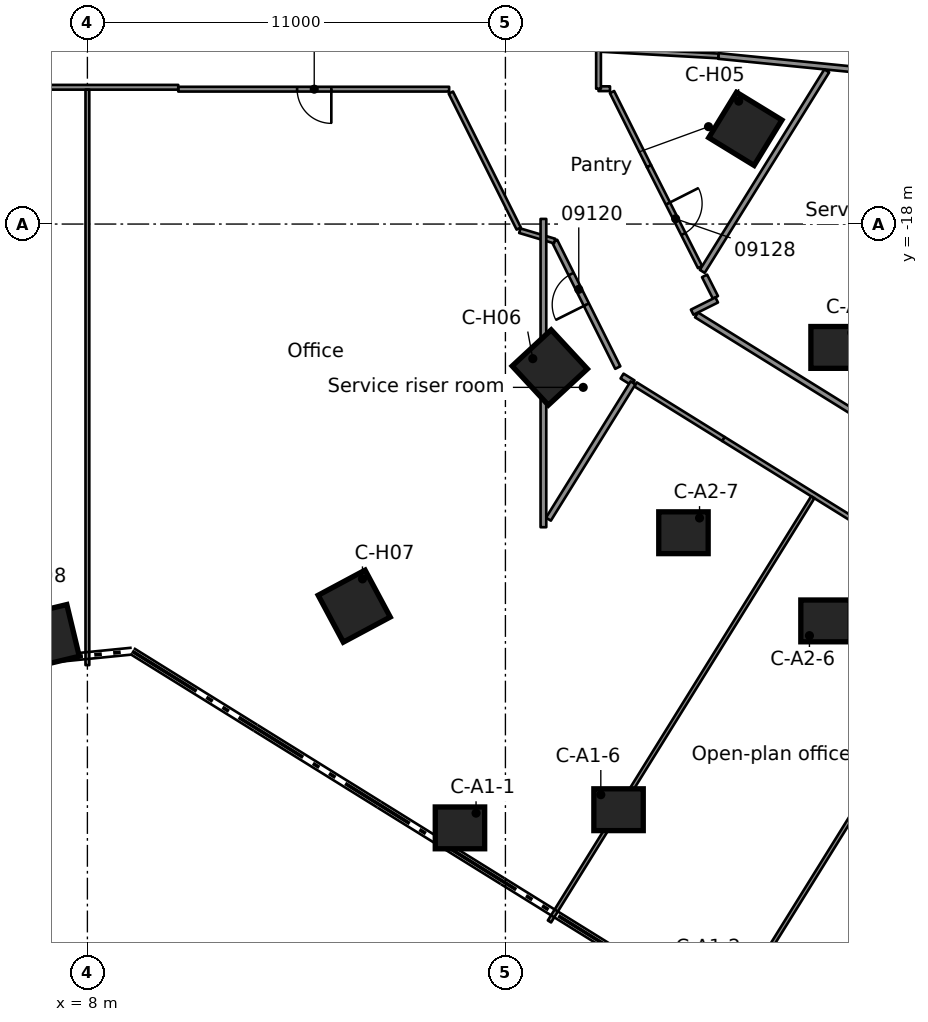
"""IFC4 building model, lengths in metres.
Left out: names, types, materials, properties, quantities, classifications, styles, units other than length and angle.
Written with IfcOpenShell. Run it as: python <this file> out.ifc"""

import sys

from ifc_helpers import new_model, si_unit, direction, frame, frame_2d, origin, origin_2d, place, context, subcontext, project, spatial, rectangle, extrude, element, fill, save


model = new_model("IFC4")
c1 = context("Model", 3, precision=1e-05, world=origin(), true_north=direction((0.0, 1.0)))
c2 = subcontext(c1, "Body", "Model", "MODEL_VIEW")
j1 = project(units=[si_unit("LENGTHUNIT", "METRE"), si_unit("PLANEANGLEUNIT", "RADIAN")], contexts=[c1])
p1 = place(None, origin())
s1 = spatial("IfcSite", under=j1, at=p1, CompositionType="ELEMENT")
p2 = place(p1, origin())
s2 = spatial("IfcBuilding", under=s1, at=p2, CompositionType="ELEMENT")
p3 = place(p2, frame((0.0, 0.0, 40.8)))
s3 = spatial("IfcBuildingStorey", under=s2, at=p3, CompositionType="ELEMENT", Elevation=40.8)
for number, where, z_axis, x_axis in (
    (1, (17.804, -33.888, 0.0), (0.0, 0.0, 1.0), (1.0, 0.0, 0.0)),
    (2, (21.977, -33.41, 0.0), (0.0, 0.0, 1.0), (1.0, 0.0, 0.0)),
    (3, (27.423, -28.442, 0.0), (0.0, 0.0, 1.0), (1.0, 0.0, 0.0)),
    (4, (23.685, -26.122, 0.0), (0.0, 0.0, 1.0), (1.0, 0.0, 0.0)),
    (5, (27.688, -21.246, 0.0), (0.0, 0.0, 1.0), (1.0, 0.0, 0.0)),
):
    element("IfcColumn", number, at=place(p3, frame(where, z_axis=z_axis, x_axis=x_axis)), inside=s3, PredefinedType="COLUMN", context=c2, shape_type="SweptSolid", body=[
        extrude(rectangle(XDim=1.3, YDim=1.1, at=origin_2d()), origin(), (0.0, 0.0, 1.0), 3.5),
    ])
for number, where, z_axis, x_axis in (
    (6, (25.313, -15.495, 0.0), (0.0, 0.0, 1.0), (0.853, -0.522, 0.0)),
    (7, (20.167, -21.774, 0.0), (0.0, 0.0, 1.0), (0.68, -0.734, 0.0)),
    (8, (15.021, -28.054, 0.0), (0.0, 0.0, 1.0), (0.472, -0.882, 0.0)),
    (9, (6.942, -28.856, 0.0), (0.0, 0.0, 1.0), (0.234, -0.972, 0.0)),
):
    element("IfcColumn", number, at=place(p3, frame(where, z_axis=z_axis, x_axis=x_axis)), inside=s3, PredefinedType="COLUMN", context=c2, shape_type="SweptSolid", body=[
        extrude(rectangle(XDim=1.4, YDim=1.4, at=origin_2d()), origin(), (0.0, 0.0, 1.0), 3.5),
    ])
p4 = place(p3, frame((17.564, -14.541, 0.0), z_axis=(0.0, 0.0, 1.0), x_axis=(0.446749443477, -0.894659116509, 0.0)))
e10 = element("IfcWall", 10, at=p4, inside=s3, PredefinedType="PARTITIONING", context=c2, shape_type="SweptSolid", body=[
    extrude(rectangle(XDim=3.998, YDim=0.125, at=frame_2d((1.999, 0.0))), origin(), (0.0, 0.0, 1.0), 3.06),
])
p5 = place(p3, frame((21.957, -21.776, 0.0), z_axis=(0.0, 0.0, 1.0), x_axis=(-0.446609612261, 0.894728927797, 0.0)))
e11 = element("IfcWall", 11, at=p5, inside=s3, PredefinedType="PARTITIONING", context=c2, shape_type="SweptSolid", body=[
    extrude(rectangle(XDim=3.719, YDim=0.15, at=frame_2d((1.86, 0.0))), origin(), (0.0, 0.0, 1.0), 3.06),
])
p6 = place(p5, frame((1.85, 0.0, 0.0)))
e12 = element("IfcOpeningElement", 12, at=p6, cuts=e11, PredefinedType="OPENING", context=c2, shape_type="SweptSolid", body=[
    extrude(rectangle(XDim=0.9, YDim=2.1, at=frame_2d((0.45, 1.05))), frame((0.0, 0.085, 0.0), z_axis=(0.0, -1.0, 0.0), x_axis=(1.0, 0.0, 0.0)), (0.0, 0.0, 1.0), 0.17),
])
p7 = place(p3, frame((21.805, -14.527, 0.0), z_axis=(0.0, 0.0, 1.0), x_axis=(0.446720903114, -0.894673367616, 0.0)))
e13 = element("IfcWall", 13, at=p7, inside=s3, PredefinedType="PARTITIONING", context=c2, shape_type="SweptSolid", body=[
    extrude(rectangle(XDim=2.181, YDim=0.125, at=frame_2d((1.09, 0.0))), origin(), (0.0, 0.0, 1.0), 3.06),
])
p8 = place(p3, frame((24.24, -19.364, 0.0), z_axis=(0.0, 0.0, 1.0), x_axis=(0.451527001133, -0.892257455698, 0.0)))
e14 = element("IfcWall", 14, at=p8, inside=s3, PredefinedType="PARTITIONING", context=c2, shape_type="SweptSolid", body=[
    extrude(rectangle(XDim=0.633, YDim=0.15, at=frame_2d((0.316, 0.0))), origin(), (0.0, 0.0, 1.0), 3.06),
])
p9 = place(p3, frame((22.779, -16.478, 0.0), z_axis=(0.0, 0.0, 1.0), x_axis=(0.451638349486, -0.892201099121, 0.0)))
e15 = element("IfcWall", 15, at=p9, inside=s3, PredefinedType="PARTITIONING", context=c2, shape_type="SweptSolid", body=[
    extrude(rectangle(XDim=2.976, YDim=0.125, at=frame_2d((1.488, 0.0))), origin(), (0.0, 0.0, 1.0), 3.06),
])
p10 = place(p9, frame((1.1, 0.0, 0.0)))
e16 = element("IfcOpeningElement", 16, at=p10, cuts=e15, PredefinedType="OPENING", context=c2, shape_type="SweptSolid", body=[
    extrude(rectangle(XDim=0.9, YDim=2.1, at=frame_2d((0.45, 1.05))), frame((0.0, 0.073, 0.0), z_axis=(0.0, -1.0, 0.0), x_axis=(1.0, 0.0, 0.0)), (0.0, 0.0, 1.0), 0.145),
])
p11 = place(p3, frame((22.424, -22.219, 0.0), z_axis=(0.0, 0.0, 1.0), x_axis=(0.849454635984, -0.527661654287, 0.0)))
e17 = element("IfcWall", 17, at=p11, inside=s3, PredefinedType="PARTITIONING", context=c2, shape_type="SweptSolid", body=[
    extrude(rectangle(XDim=2.725, YDim=0.125, at=frame_2d((1.363, 0.0))), origin(), (0.0, 0.0, 1.0), 3.06),
])
p12 = place(p3, frame((22.069, -22.0, 0.0), z_axis=(0.0, 0.0, 1.0), x_axis=(0.850050687586, -0.526700890956, 0.0)))
e18 = element("IfcWall", 18, at=p12, inside=s3, PredefinedType="PARTITIONING", context=c2, shape_type="SweptSolid", body=[
    extrude(rectangle(XDim=0.34, YDim=0.15, at=frame_2d((0.17, 0.0))), origin(), (0.0, 0.0, 1.0), 3.06),
])
p13 = place(p3, frame((43.367, -35.223, 0.0), z_axis=(0.0, 0.0, 1.0), x_axis=(-0.849563429412, 0.527486473197, 0.0)))
e19 = element("IfcWall", 19, at=p13, inside=s3, PredefinedType="PARTITIONING", context=c2, shape_type="SweptSolid", body=[
    extrude(rectangle(XDim=21.927, YDim=0.125, at=frame_2d((10.963, 0.0))), origin(), (0.0, 0.0, 1.0), 3.06),
])
p14 = place(p13, frame((10.574, 0.0, 0.0)))
e20 = element("IfcOpeningElement", 20, at=p14, cuts=e19, PredefinedType="OPENING", context=c2, shape_type="SweptSolid", body=[
    extrude(rectangle(XDim=0.9, YDim=2.1, at=frame_2d((0.45, 1.05))), frame((0.0, 0.073, 0.0), z_axis=(0.0, -1.0, 0.0), x_axis=(1.0, 0.0, 0.0)), (0.0, 0.0, 1.0), 0.145),
])
p15 = place(p13, frame((4.973, 0.0, 0.0)))
e21 = element("IfcOpeningElement", 21, at=p15, cuts=e19, PredefinedType="OPENING", context=c2, shape_type="SweptSolid", body=[
    extrude(rectangle(XDim=0.9, YDim=2.1, at=frame_2d((0.45, 1.05))), frame((0.0, 0.073, 0.0), z_axis=(0.0, -1.0, 0.0), x_axis=(1.0, 0.0, 0.0)), (0.0, 0.0, 1.0), 0.145),
])
p16 = place(p13, frame((15.923, 0.0, 0.0)))
e22 = element("IfcOpeningElement", 22, at=p16, cuts=e19, PredefinedType="OPENING", context=c2, shape_type="SweptSolid", body=[
    extrude(rectangle(XDim=1.1, YDim=2.1, at=frame_2d((0.55, 1.05))), frame((0.0, 0.073, 0.0), z_axis=(0.0, -1.0, 0.0), x_axis=(1.0, 0.0, 0.0)), (0.0, 0.0, 1.0), 0.145),
])
p17 = place(p3, frame((24.028, -20.39, 0.0), z_axis=(0.0, 0.0, 1.0), x_axis=(0.8496545068, -0.527339756775, 0.0)))
e23 = element("IfcWall", 23, at=p17, inside=s3, PredefinedType="PARTITIONING", context=c2, shape_type="SweptSolid", body=[
    extrude(rectangle(XDim=21.569, YDim=0.15, at=frame_2d((10.784, 0.0))), origin(), (0.0, 0.0, 1.0), 3.06),
])
p18 = place(p17, frame((15.532, 0.0, 0.0)))
e24 = element("IfcOpeningElement", 24, at=p18, cuts=e23, PredefinedType="OPENING", context=c2, shape_type="SweptSolid", body=[
    extrude(rectangle(XDim=0.9, YDim=2.1, at=frame_2d((0.45, 1.05))), frame((0.0, 0.085, 0.0), z_axis=(0.0, -1.0, 0.0), x_axis=(1.0, 0.0, 0.0)), (0.0, 0.0, 1.0), 0.17),
])
p19 = place(p3, frame((24.604, -13.577, 0.0), z_axis=(0.0, 0.0, 1.0), x_axis=(0.995072238477, -0.099152610724, 0.0)))
e25 = element("IfcWall", 25, at=p19, inside=s3, PredefinedType="PARTITIONING", context=c2, shape_type="SweptSolid", body=[
    extrude(rectangle(XDim=3.511, YDim=0.15, at=frame_2d((1.756, 0.0))), origin(), (0.0, 0.0, 1.0), 3.06),
])
p20 = place(p3, frame((24.604, -13.577, 0.0), z_axis=(0.0, 0.0, 1.0), x_axis=(-0.998441130735, 0.055814948327, 0.0)))
e26 = element("IfcWall", 26, at=p20, inside=s3, PredefinedType="PARTITIONING", context=c2, shape_type="SweptSolid", body=[
    extrude(rectangle(XDim=3.097, YDim=0.125, at=frame_2d((1.548, 0.0))), origin(), (0.0, 0.0, 1.0), 3.06),
])
p21 = place(p3, frame((17.519, -14.451, 0.0), z_axis=(0.0, 0.0, 1.0), x_axis=(-1.0, 0.0, 0.0)))
e27 = element("IfcWall", 27, at=p21, inside=s3, PredefinedType="PARTITIONING", context=c2, shape_type="SweptSolid", body=[
    extrude(rectangle(XDim=7.128, YDim=0.125, at=frame_2d((3.564, 0.0))), origin(), (0.0, 0.0, 1.0), 3.06),
])
p22 = place(p21, frame((3.1, 0.0, 0.0)))
e28 = element("IfcOpeningElement", 28, at=p22, cuts=e27, PredefinedType="OPENING", context=c2, shape_type="SweptSolid", body=[
    extrude(rectangle(XDim=0.9, YDim=2.1, at=frame_2d((0.45, 1.05))), frame((0.0, 0.073, 0.0), z_axis=(0.0, -1.0, 0.0), x_axis=(1.0, 0.0, 0.0)), (0.0, 0.0, 1.0), 0.145),
])
p23 = place(p3, frame((21.45, -14.439, 0.0), z_axis=(0.0, 0.0, 1.0), x_axis=(1.0, 0.0, 0.0)))
e29 = element("IfcWall", 29, at=p23, inside=s3, PredefinedType="PARTITIONING", context=c2, shape_type="SweptSolid", body=[
    extrude(rectangle(XDim=0.302, YDim=0.125, at=frame_2d((0.151, 0.0))), origin(), (0.0, 0.0, 1.0), 3.06),
])
p24 = place(p3, frame((10.391, -14.401, 0.0), z_axis=(0.0, 0.0, 1.0), x_axis=(-1.0, 0.0, 0.0)))
e30 = element("IfcWall", 30, at=p24, inside=s3, PredefinedType="PARTITIONING", context=c2, shape_type="SweptSolid", body=[
    extrude(rectangle(XDim=20.781, YDim=0.125, at=frame_2d((10.391, 0.0))), origin(), (0.0, 0.0, 1.0), 3.06),
])
p25 = place(p24, frame((13.491, 0.0, 0.0)))
e31 = element("IfcOpeningElement", 31, at=p25, cuts=e30, PredefinedType="OPENING", context=c2, shape_type="SweptSolid", body=[
    extrude(rectangle(XDim=1.8, YDim=2.1, at=frame_2d((0.9, 1.05))), frame((0.0, 0.073, 0.0), z_axis=(0.0, -1.0, 0.0), x_axis=(1.0, 0.0, 0.0)), (0.0, 0.0, 1.0), 0.145),
])
p26 = place(p24, frame((5.991, 0.0, 0.0)))
e32 = element("IfcOpeningElement", 32, at=p26, cuts=e30, PredefinedType="OPENING", context=c2, shape_type="SweptSolid", body=[
    extrude(rectangle(XDim=0.9, YDim=2.1, at=frame_2d((0.45, 1.05))), frame((0.0, 0.073, 0.0), z_axis=(0.0, -1.0, 0.0), x_axis=(1.0, 0.0, 0.0)), (0.0, 0.0, 1.0), 0.145),
])
p27 = place(p3, frame((23.914, -20.319, 0.0), z_axis=(0.0, 0.0, 1.0), x_axis=(0.894967710853, 0.4461309186, 0.0)))
e33 = element("IfcWall", 33, at=p27, inside=s3, PredefinedType="PARTITIONING", context=c2, shape_type="SweptSolid", body=[
    extrude(rectangle(XDim=0.722, YDim=0.15, at=frame_2d((0.361, 0.0))), origin(), (0.0, 0.0, 1.0), 3.06),
])
p28 = place(p3, frame((19.379, -18.175, 0.0), z_axis=(0.0, 0.0, 1.0), x_axis=(0.958442111331, -0.285287082127, 0.0)))
e34 = element("IfcWall", 34, at=p28, inside=s3, PredefinedType="PARTITIONING", context=c2, shape_type="SweptSolid", body=[
    extrude(rectangle(XDim=0.957, YDim=0.125, at=frame_2d((0.479, 0.0))), origin(), (0.0, 0.0, 1.0), 3.06),
])
p29 = place(p3, frame((24.662, -39.146, 0.0), z_axis=(0.0, 0.0, 1.0), x_axis=(0.527445667816, 0.849588763757, 0.0)))
e35 = element("IfcWall", 35, at=p29, inside=s3, PredefinedType="PARTITIONING", context=c2, shape_type="SweptSolid", body=[
    extrude(rectangle(XDim=13.137, YDim=0.1, at=frame_2d((6.568, 0.0))), origin(), (0.0, 0.0, 1.0), 3.06),
])
p30 = place(p3, frame((20.159, -36.35, 0.0), z_axis=(0.0, 0.0, 1.0), x_axis=(0.527437340002, 0.849593933813, 0.0)))
e36 = element("IfcWall", 36, at=p30, inside=s3, PredefinedType="PARTITIONING", context=c2, shape_type="SweptSolid", body=[
    extrude(rectangle(XDim=13.137, YDim=0.1, at=frame_2d((6.568, 0.0))), origin(), (0.0, 0.0, 1.0), 3.06),
])
p31 = place(p3, frame((20.132, -25.765, 0.0), z_axis=(0.0, 0.0, 1.0), x_axis=(0.527375821056, 0.849632122372, 0.0)))
e37 = element("IfcWall", 37, at=p31, inside=s3, PredefinedType="PARTITIONING", context=c2, shape_type="SweptSolid", body=[
    extrude(rectangle(XDim=4.22, YDim=0.15, at=frame_2d((2.11, 0.0))), origin(), (0.0, 0.0, 1.0), 3.06),
])
p32 = place(p3, frame((24.18, -19.245, 0.0), z_axis=(0.0, 0.0, 1.0), x_axis=(0.527399070795, 0.849617690567, 0.0)))
e38 = element("IfcWall", 38, at=p32, inside=s3, PredefinedType="PARTITIONING", context=c2, shape_type="SweptSolid", body=[
    extrude(rectangle(XDim=6.21, YDim=0.15, at=frame_2d((3.105, 0.0))), origin(), (0.0, 0.0, 1.0), 3.06),
])
p33 = place(p3, frame((21.45, -14.439, 0.0), z_axis=(0.0, 0.0, 1.0), x_axis=(0.0, 1.0, 0.0)))
e39 = element("IfcWall", 39, at=p33, inside=s3, PredefinedType="PARTITIONING", context=c2, shape_type="SweptSolid", body=[
    extrude(rectangle(XDim=1.039, YDim=0.125, at=frame_2d((0.52, 0.0))), origin(), (0.0, 0.0, 1.0), 3.06),
])
p34 = place(p3, frame((20.0, -25.977, 0.0), z_axis=(0.0, 0.0, 1.0), x_axis=(0.0, 1.0, 0.0)))
e40 = element("IfcWall", 40, at=p34, inside=s3, PredefinedType="PARTITIONING", context=c2, shape_type="SweptSolid", body=[
    extrude(rectangle(XDim=8.112, YDim=0.15, at=frame_2d((4.056, 0.0))), origin(), (0.0, 0.0, 1.0), 3.06),
])
p35 = place(p3, frame((8.0, -29.605, 0.0), z_axis=(0.0, 0.0, 1.0), x_axis=(0.0, 1.0, 0.0)))
e41 = element("IfcWall", 41, at=p35, inside=s3, PredefinedType="PARTITIONING", context=c2, shape_type="SweptSolid", body=[
    extrude(rectangle(XDim=15.142, YDim=0.1, at=frame_2d((7.571, 0.0))), origin(), (0.0, 0.0, 1.0), 3.06),
])
p36 = place(p6, origin())
e42 = element("IfcDoor", 42, at=p36, inside=s3, OperationType="SINGLE_SWING_RIGHT", PredefinedType="DOOR", context=c2, shape_type="SweptSolid", body=[
    extrude(rectangle(XDim=0.9, YDim=2.1, at=frame_2d((0.45, 1.05))), frame((0.0, 0.025, 0.0), z_axis=(0.0, -1.0, 0.0), x_axis=(1.0, 0.0, 0.0)), (0.0, 0.0, 1.0), 0.05),
])
fill(e12, e42)
p37 = place(p22, origin())
e43 = element("IfcDoor", 43, at=p37, inside=s3, OperationType="SINGLE_SWING_LEFT", PredefinedType="DOOR", context=c2, shape_type="SweptSolid", body=[
    extrude(rectangle(XDim=0.9, YDim=2.1, at=frame_2d((0.45, 1.05))), frame((0.0, 0.025, 0.0), z_axis=(0.0, -1.0, 0.0), x_axis=(1.0, 0.0, 0.0)), (0.0, 0.0, 1.0), 0.05),
])
fill(e28, e43)
p38 = place(p10, origin())
e44 = element("IfcDoor", 44, at=p38, inside=s3, OperationType="SINGLE_SWING_RIGHT", PredefinedType="DOOR", context=c2, shape_type="SweptSolid", body=[
    extrude(rectangle(XDim=0.9, YDim=2.1, at=frame_2d((0.45, 1.05))), frame((0.0, 0.025, 0.0), z_axis=(0.0, -1.0, 0.0), x_axis=(1.0, 0.0, 0.0)), (0.0, 0.0, 1.0), 0.05),
])
fill(e16, e44)
save(model, sys.argv[1])
